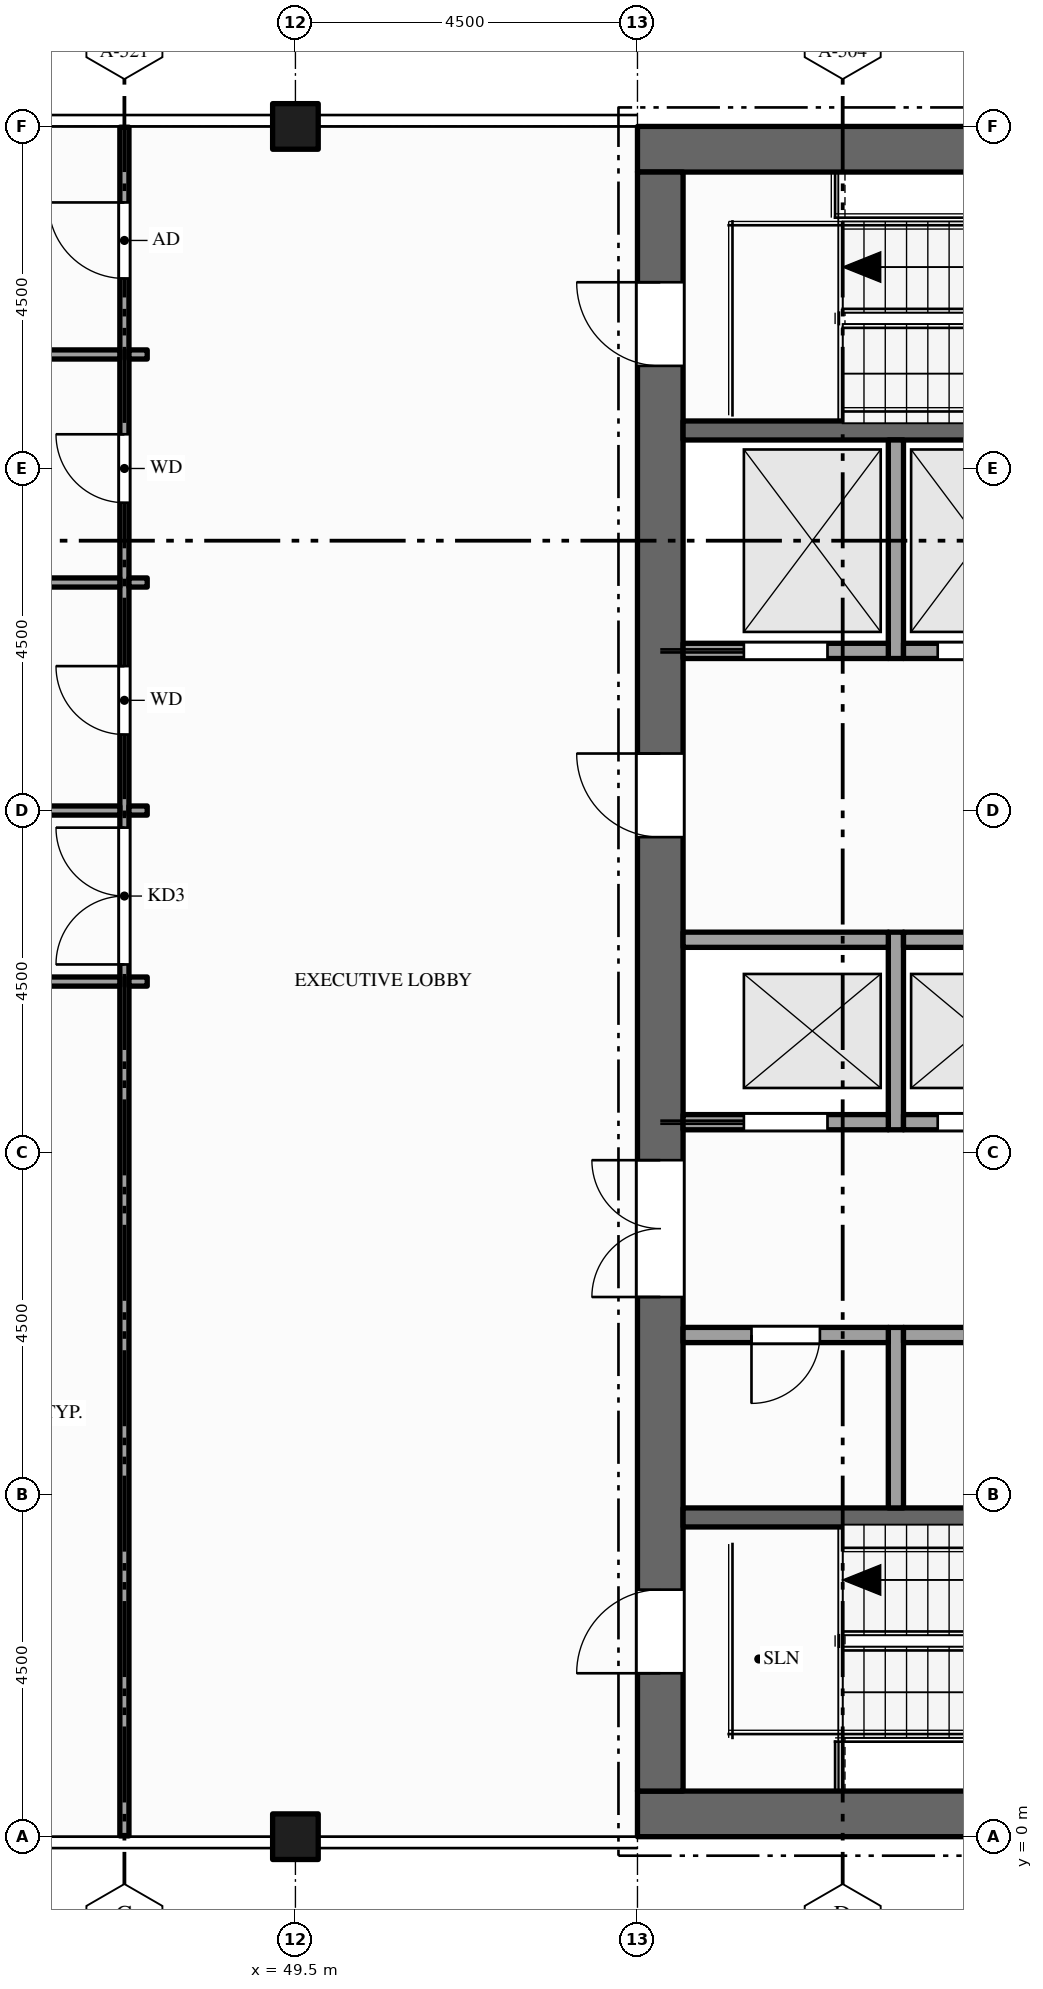
"""IFC4 building model, lengths in metres.
Left out: names, types, materials, properties, quantities, classifications, styles, units other than length and angle.
Written with IfcOpenShell. Run it as: python <this file> out.ifc"""

import sys

from ifc_helpers import new_model, si_unit, direction, frame, frame_2d, origin, origin_2d, place, context, subcontext, project, spatial, rectangle, hollow_rectangle, extrude, element, fill, save


model = new_model("IFC4")
c1 = context("Model", 3, precision=1e-05, world=origin(), true_north=direction((0.0, 1.0)))
c2 = subcontext(c1, "Body", "Model", "MODEL_VIEW")
j1 = project(units=[si_unit("LENGTHUNIT", "METRE"), si_unit("PLANEANGLEUNIT", "RADIAN")], contexts=[c1])
p1 = place(None, origin())
s1 = spatial("IfcSite", under=j1, at=p1, CompositionType="ELEMENT")
p2 = place(p1, origin())
s2 = spatial("IfcBuilding", under=s1, at=p2, CompositionType="ELEMENT")
p3 = place(p2, frame((0.0, 0.0, 323.0)))
s3 = spatial("IfcBuildingStorey", under=s2, at=p3, CompositionType="ELEMENT", Elevation=323.0)
for number, where, z_axis, x_axis in (
    (1, (67.5, 0.3, -0.15), (0.0, 0.0, 1.0), (-1.0, 0.0, 0.0)),
    (2, (54.0, 22.2, -0.15), (0.0, 0.0, 1.0), (1.0, 0.0, 0.0)),
):
    element("IfcWall", number, at=place(p3, frame(where, z_axis=z_axis, x_axis=x_axis)), inside=s3, PredefinedType="SHEAR", context=c2, shape_type="SweptSolid", body=[
        extrude(rectangle(XDim=13.5, YDim=0.6, at=frame_2d((6.75, 0.0))), origin(), (0.0, 0.0, 1.0), 4.5),
    ])
p4 = place(p3, frame((54.3, 0.6, -0.15), z_axis=(0.0, 0.0, 1.0), x_axis=(0.0, 1.0, 0.0)))
e3 = element("IfcWall", 3, at=p4, inside=s3, PredefinedType="SHEAR", context=c2, shape_type="SweptSolid", body=[
    extrude(rectangle(XDim=21.3, YDim=0.6, at=frame_2d((10.65, 0.0))), origin(), (0.0, 0.0, 1.0), 4.5),
])
p5 = place(p4, frame((6.5, 0.0, 0.15)))
e4 = element("IfcOpeningElement", 4, at=p5, cuts=e3, PredefinedType="OPENING", context=c2, shape_type="SweptSolid", body=[
    extrude(rectangle(XDim=1.8, YDim=2.1, at=frame_2d((0.9, 1.05))), frame((0.0, 0.31, 0.0), z_axis=(0.0, -1.0, 0.0), x_axis=(1.0, 0.0, 0.0)), (0.0, 0.0, 1.0), 0.62),
])
p6 = place(p4, frame((12.55, 0.0, 0.15)))
e5 = element("IfcOpeningElement", 5, at=p6, cuts=e3, PredefinedType="OPENING", context=c2, shape_type="SweptSolid", body=[
    extrude(rectangle(XDim=1.1, YDim=2.1, at=frame_2d((0.55, 1.05))), frame((0.0, 0.31, 0.0), z_axis=(0.0, -1.0, 0.0), x_axis=(1.0, 0.0, 0.0)), (0.0, 0.0, 1.0), 0.62),
])
p7 = place(p4, frame((1.55, 0.0, 0.15)))
e6 = element("IfcOpeningElement", 6, at=p7, cuts=e3, PredefinedType="OPENING", context=c2, shape_type="SweptSolid", body=[
    extrude(rectangle(XDim=1.1, YDim=2.1, at=frame_2d((0.55, 1.05))), frame((0.0, 0.31, 0.0), z_axis=(0.0, -1.0, 0.0), x_axis=(1.0, 0.0, 0.0)), (0.0, 0.0, 1.0), 0.62),
])
p8 = place(p4, frame((18.75, 0.0, 0.15)))
e7 = element("IfcOpeningElement", 7, at=p8, cuts=e3, PredefinedType="OPENING", context=c2, shape_type="SweptSolid", body=[
    extrude(rectangle(XDim=1.1, YDim=2.1, at=frame_2d((0.55, 1.05))), frame((0.0, 0.31, 0.0), z_axis=(0.0, -1.0, 0.0), x_axis=(1.0, 0.0, 0.0)), (0.0, 0.0, 1.0), 0.62),
])
for number, where, z_axis, x_axis in (
    (8, (49.5, 0.0, -0.15), (0.0, 0.0, 1.0), (1.0, 0.0, 0.0)),
    (9, (49.5, 22.5, -0.15), (0.0, 0.0, 1.0), (1.0, 0.0, 0.0)),
):
    element("IfcColumn", number, at=place(p3, frame(where, z_axis=z_axis, x_axis=x_axis)), inside=s3, PredefinedType="COLUMN", context=c2, shape_type="SweptSolid", body=[
        extrude(hollow_rectangle(XDim=0.6, YDim=0.6, WallThickness=0.03, at=origin_2d()), origin(), (0.0, 0.0, 1.0), 4.5),
    ])
p9 = place(p3, frame((47.25, 0.01, 0.0), z_axis=(0.0, 0.0, 1.0), x_axis=(0.0, 1.0, 0.0)))
e10 = element("IfcWall", 10, at=p9, inside=s3, PredefinedType="PARTITIONING", context=c2, shape_type="SweptSolid", body=[
    extrude(rectangle(XDim=22.48, YDim=0.12, at=frame_2d((11.24, 0.0))), origin(), (0.0, 0.0, 1.0), 3.359),
])
p10 = place(p9, frame((11.465, 0.0, 0.0)))
e11 = element("IfcOpeningElement", 11, at=p10, cuts=e10, PredefinedType="OPENING", context=c2, shape_type="SweptSolid", body=[
    extrude(rectangle(XDim=1.8, YDim=2.1, at=frame_2d((0.9, 1.05))), frame((0.0, 0.07, 0.0), z_axis=(0.0, -1.0, 0.0), x_axis=(1.0, 0.0, 0.0)), (0.0, 0.0, 1.0), 0.14),
])
p11 = place(p9, frame((14.49, 0.0, 0.0)))
e12 = element("IfcOpeningElement", 12, at=p11, cuts=e10, PredefinedType="OPENING", context=c2, shape_type="SweptSolid", body=[
    extrude(rectangle(XDim=0.9, YDim=2.1, at=frame_2d((0.45, 1.05))), frame((0.0, 0.07, 0.0), z_axis=(0.0, -1.0, 0.0), x_axis=(1.0, 0.0, 0.0)), (0.0, 0.0, 1.0), 0.14),
])
p12 = place(p9, frame((17.54, 0.0, 0.0)))
e13 = element("IfcOpeningElement", 13, at=p12, cuts=e10, PredefinedType="OPENING", context=c2, shape_type="SweptSolid", body=[
    extrude(rectangle(XDim=0.9, YDim=2.1, at=frame_2d((0.45, 1.05))), frame((0.0, 0.07, 0.0), z_axis=(0.0, -1.0, 0.0), x_axis=(1.0, 0.0, 0.0)), (0.0, 0.0, 1.0), 0.14),
])
p13 = place(p9, frame((20.49, 0.0, 0.0)))
e14 = element("IfcOpeningElement", 14, at=p13, cuts=e10, PredefinedType="OPENING", context=c2, shape_type="SweptSolid", body=[
    extrude(rectangle(XDim=1.0, YDim=2.1, at=frame_2d((0.5, 1.05))), frame((0.0, 0.07, 0.0), z_axis=(0.0, -1.0, 0.0), x_axis=(1.0, 0.0, 0.0)), (0.0, 0.0, 1.0), 0.14),
])
p14 = place(p3, frame((57.4, 4.325, 0.0), z_axis=(0.0, 0.0, 1.0), x_axis=(0.0, 1.0, 0.0)))
e15 = element("IfcWall", 15, at=p14, inside=s3, PredefinedType="PARTITIONING", context=c2, shape_type="SweptSolid", body=[
    extrude(rectangle(XDim=2.375, YDim=0.2, at=frame_2d((1.188, 0.0))), origin(), (0.0, 0.0, 1.0), 4.35),
])
p15 = place(p3, frame((57.4, 9.3, 0.0), z_axis=(0.0, 0.0, 1.0), x_axis=(0.0, 1.0, 0.0)))
e16 = element("IfcWall", 16, at=p15, inside=s3, PredefinedType="SOLIDWALL", context=c2, shape_type="SweptSolid", body=[
    extrude(rectangle(XDim=2.6, YDim=0.2, at=frame_2d((1.3, 0.0))), origin(), (0.0, 0.0, 1.0), 4.35),
])
p16 = place(p3, frame((57.4, 15.5, 0.0), z_axis=(0.0, 0.0, 1.0), x_axis=(0.0, 1.0, 0.0)))
e17 = element("IfcWall", 17, at=p16, inside=s3, PredefinedType="SOLIDWALL", context=c2, shape_type="SweptSolid", body=[
    extrude(rectangle(XDim=2.875, YDim=0.2, at=frame_2d((1.438, 0.0))), origin(), (0.0, 0.0, 1.0), 4.35),
])
p17 = place(p3, frame((54.6, 4.2, 0.0), z_axis=(0.0, 0.0, 1.0), x_axis=(1.0, 0.0, 0.0)))
e18 = element("IfcWall", 18, at=p17, inside=s3, PredefinedType="SHEAR", context=c2, shape_type="SweptSolid", body=[
    extrude(rectangle(XDim=6.675, YDim=0.25, at=frame_2d((3.337, 0.0))), origin(), (0.0, 0.0, 1.0), 4.35),
])
p18 = place(p3, frame((54.6, 6.6, 0.0), z_axis=(0.0, 0.0, 1.0), x_axis=(1.0, 0.0, 0.0)))
e19 = element("IfcWall", 19, at=p18, inside=s3, PredefinedType="PARTITIONING", context=c2, shape_type="SweptSolid", body=[
    extrude(rectangle(XDim=2.7, YDim=0.2, at=frame_2d((1.35, 0.0))), origin(), (0.0, 0.0, 1.0), 4.35),
])
p19 = place(p18, frame((0.9, 0.0, 0.0)))
e20 = element("IfcOpeningElement", 20, at=p19, cuts=e19, PredefinedType="OPENING", context=c2, shape_type="SweptSolid", body=[
    extrude(rectangle(XDim=0.9, YDim=2.1, at=frame_2d((0.45, 1.05))), frame((0.0, 0.11, 0.0), z_axis=(0.0, -1.0, 0.0), x_axis=(1.0, 0.0, 0.0)), (0.0, 0.0, 1.0), 0.22),
])
p20 = place(p3, frame((57.5, 6.6, 0.0), z_axis=(0.0, 0.0, 1.0), x_axis=(1.0, 0.0, 0.0)))
e21 = element("IfcWall", 21, at=p20, inside=s3, PredefinedType="PARTITIONING", context=c2, shape_type="SweptSolid", body=[
    extrude(rectangle(XDim=4.2, YDim=0.2, at=frame_2d((2.1, 0.0))), origin(), (0.0, 0.0, 1.0), 4.35),
])
p21 = place(p20, frame((1.65, 0.0, 0.0)))
e22 = element("IfcOpeningElement", 22, at=p21, cuts=e21, PredefinedType="OPENING", context=c2, shape_type="SweptSolid", body=[
    extrude(rectangle(XDim=0.9, YDim=2.1, at=frame_2d((0.45, 1.05))), frame((0.0, 0.11, 0.0), z_axis=(0.0, -1.0, 0.0), x_axis=(1.0, 0.0, 0.0)), (0.0, 0.0, 1.0), 0.22),
])
p22 = place(p3, frame((54.6, 9.4, 0.0), z_axis=(0.0, 0.0, 1.0), x_axis=(1.0, 0.0, 0.0)))
e23 = element("IfcWall", 23, at=p22, inside=s3, PredefinedType="SOLIDWALL", context=c2, shape_type="SweptSolid", body=[
    extrude(rectangle(XDim=2.7, YDim=0.2, at=frame_2d((1.35, 0.0))), origin(), (0.0, 0.0, 1.0), 4.35),
])
p23 = place(p22, frame((0.8, 0.0, 0.012)))
e24 = element("IfcOpeningElement", 24, at=p23, cuts=e23, PredefinedType="OPENING", context=c2, shape_type="SweptSolid", body=[
    extrude(rectangle(XDim=1.1, YDim=2.1, at=frame_2d((0.55, 1.05))), frame((0.0, 0.11, 0.0), z_axis=(0.0, -1.0, 0.0), x_axis=(1.0, 0.0, 0.0)), (0.0, 0.0, 1.0), 0.22),
])
p24 = place(p3, frame((57.5, 9.4, 0.0), z_axis=(0.0, 0.0, 1.0), x_axis=(1.0, 0.0, 0.0)))
e25 = element("IfcWall", 25, at=p24, inside=s3, PredefinedType="SOLIDWALL", context=c2, shape_type="SweptSolid", body=[
    extrude(rectangle(XDim=2.0, YDim=0.2, at=frame_2d((1.0, 0.0))), origin(), (0.0, 0.0, 1.0), 4.35),
])
p25 = place(p24, frame((0.45, 0.0, 0.012)))
e26 = element("IfcOpeningElement", 26, at=p25, cuts=e25, PredefinedType="OPENING", context=c2, shape_type="SweptSolid", body=[
    extrude(rectangle(XDim=1.1, YDim=2.1, at=frame_2d((0.55, 1.05))), frame((0.0, 0.11, 0.0), z_axis=(0.0, -1.0, 0.0), x_axis=(1.0, 0.0, 0.0)), (0.0, 0.0, 1.0), 0.22),
])
p26 = place(p3, frame((38.31, 11.25, 0.0), z_axis=(0.0, 0.0, 1.0), x_axis=(1.0, 0.0, 0.0)))
e27 = element("IfcWall", 27, at=p26, inside=s3, PredefinedType="PARTITIONING", context=c2, shape_type="SweptSolid", body=[
    extrude(rectangle(XDim=8.88, YDim=0.12, at=frame_2d((4.44, 0.0))), origin(), (0.0, 0.0, 1.0), 3.359),
])
p27 = place(p26, frame((3.84, 0.0, 0.0)))
e28 = element("IfcOpeningElement", 28, at=p27, cuts=e27, PredefinedType="OPENING", context=c2, shape_type="SweptSolid", body=[
    extrude(rectangle(XDim=1.2, YDim=2.1, at=frame_2d((0.6, 1.05))), frame((0.0, 0.07, 0.0), z_axis=(0.0, -1.0, 0.0), x_axis=(1.0, 0.0, 0.0)), (0.0, 0.0, 1.0), 0.14),
])
p28 = place(p3, frame((47.31, 11.25, 0.0), z_axis=(0.0, 0.0, 1.0), x_axis=(1.0, 0.0, 0.0)))
e29 = element("IfcWall", 29, at=p28, inside=s3, PredefinedType="PARTITIONING", context=c2, shape_type="SweptSolid", body=[
    extrude(rectangle(XDim=0.24, YDim=0.12, at=frame_2d((0.12, 0.0))), origin(), (0.0, 0.0, 1.0), 3.359),
])
p29 = place(p3, frame((54.6, 11.8, 0.0), z_axis=(0.0, 0.0, 1.0), x_axis=(1.0, 0.0, 0.0)))
e30 = element("IfcWall", 30, at=p29, inside=s3, PredefinedType="SOLIDWALL", context=c2, shape_type="SweptSolid", body=[
    extrude(rectangle(XDim=2.7, YDim=0.2, at=frame_2d((1.35, 0.0))), origin(), (0.0, 0.0, 1.0), 4.35),
])
p30 = place(p3, frame((57.5, 11.8, 0.0), z_axis=(0.0, 0.0, 1.0), x_axis=(1.0, 0.0, 0.0)))
e31 = element("IfcWall", 31, at=p30, inside=s3, PredefinedType="SOLIDWALL", context=c2, shape_type="SweptSolid", body=[
    extrude(rectangle(XDim=2.0, YDim=0.2, at=frame_2d((1.0, 0.0))), origin(), (0.0, 0.0, 1.0), 4.35),
])
p31 = place(p3, frame((42.81, 13.5, 0.0), z_axis=(0.0, 0.0, 1.0), x_axis=(1.0, 0.0, 0.0)))
e32 = element("IfcWall", 32, at=p31, inside=s3, PredefinedType="PARTITIONING", context=c2, shape_type="SweptSolid", body=[
    extrude(rectangle(XDim=4.38, YDim=0.12, at=frame_2d((2.19, 0.0))), origin(), (0.0, 0.0, 1.0), 3.359),
])
p32 = place(p3, frame((47.31, 13.5, 0.0), z_axis=(0.0, 0.0, 1.0), x_axis=(1.0, 0.0, 0.0)))
e33 = element("IfcWall", 33, at=p32, inside=s3, PredefinedType="PARTITIONING", context=c2, shape_type="SweptSolid", body=[
    extrude(rectangle(XDim=0.24, YDim=0.12, at=frame_2d((0.12, 0.0))), origin(), (0.0, 0.0, 1.0), 3.359),
])
p33 = place(p3, frame((54.6, 15.6, 0.0), z_axis=(0.0, 0.0, 1.0), x_axis=(1.0, 0.0, 0.0)))
e34 = element("IfcWall", 34, at=p33, inside=s3, PredefinedType="SOLIDWALL", context=c2, shape_type="SweptSolid", body=[
    extrude(rectangle(XDim=2.7, YDim=0.2, at=frame_2d((1.35, 0.0))), origin(), (0.0, 0.0, 1.0), 4.35),
])
p34 = place(p33, frame((0.8, 0.0, 0.012)))
e35 = element("IfcOpeningElement", 35, at=p34, cuts=e34, PredefinedType="OPENING", context=c2, shape_type="SweptSolid", body=[
    extrude(rectangle(XDim=1.1, YDim=2.1, at=frame_2d((0.55, 1.05))), frame((0.0, 0.11, 0.0), z_axis=(0.0, -1.0, 0.0), x_axis=(1.0, 0.0, 0.0)), (0.0, 0.0, 1.0), 0.22),
])
p35 = place(p3, frame((57.5, 15.6, 0.0), z_axis=(0.0, 0.0, 1.0), x_axis=(1.0, 0.0, 0.0)))
e36 = element("IfcWall", 36, at=p35, inside=s3, PredefinedType="SOLIDWALL", context=c2, shape_type="SweptSolid", body=[
    extrude(rectangle(XDim=2.0, YDim=0.2, at=frame_2d((1.0, 0.0))), origin(), (0.0, 0.0, 1.0), 4.35),
])
p36 = place(p35, frame((0.45, 0.0, 0.012)))
e37 = element("IfcOpeningElement", 37, at=p36, cuts=e36, PredefinedType="OPENING", context=c2, shape_type="SweptSolid", body=[
    extrude(rectangle(XDim=1.1, YDim=2.1, at=frame_2d((0.55, 1.05))), frame((0.0, 0.11, 0.0), z_axis=(0.0, -1.0, 0.0), x_axis=(1.0, 0.0, 0.0)), (0.0, 0.0, 1.0), 0.22),
])
p37 = place(p3, frame((42.81, 16.5, 0.0), z_axis=(0.0, 0.0, 1.0), x_axis=(1.0, 0.0, 0.0)))
e38 = element("IfcWall", 38, at=p37, inside=s3, PredefinedType="PARTITIONING", context=c2, shape_type="SweptSolid", body=[
    extrude(rectangle(XDim=4.38, YDim=0.12, at=frame_2d((2.19, 0.0))), origin(), (0.0, 0.0, 1.0), 3.359),
])
p38 = place(p3, frame((47.31, 16.5, 0.0), z_axis=(0.0, 0.0, 1.0), x_axis=(1.0, 0.0, 0.0)))
e39 = element("IfcWall", 39, at=p38, inside=s3, PredefinedType="PARTITIONING", context=c2, shape_type="SweptSolid", body=[
    extrude(rectangle(XDim=0.24, YDim=0.12, at=frame_2d((0.12, 0.0))), origin(), (0.0, 0.0, 1.0), 3.359),
])
p39 = place(p3, frame((54.6, 18.5, 0.0), z_axis=(0.0, 0.0, 1.0), x_axis=(1.0, 0.0, 0.0)))
e40 = element("IfcWall", 40, at=p39, inside=s3, PredefinedType="SHEAR", context=c2, shape_type="SweptSolid", body=[
    extrude(rectangle(XDim=6.675, YDim=0.25, at=frame_2d((3.337, 0.0))), origin(), (0.0, 0.0, 1.0), 4.35),
])
p40 = place(p3, frame((42.81, 19.5, 0.0), z_axis=(0.0, 0.0, 1.0), x_axis=(1.0, 0.0, 0.0)))
e41 = element("IfcWall", 41, at=p40, inside=s3, PredefinedType="PARTITIONING", context=c2, shape_type="SweptSolid", body=[
    extrude(rectangle(XDim=4.38, YDim=0.12, at=frame_2d((2.19, 0.0))), origin(), (0.0, 0.0, 1.0), 3.359),
])
p41 = place(p3, frame((47.31, 19.5, 0.0), z_axis=(0.0, 0.0, 1.0), x_axis=(1.0, 0.0, 0.0)))
e42 = element("IfcWall", 42, at=p41, inside=s3, PredefinedType="PARTITIONING", context=c2, shape_type="SweptSolid", body=[
    extrude(rectangle(XDim=0.24, YDim=0.12, at=frame_2d((0.12, 0.0))), origin(), (0.0, 0.0, 1.0), 3.359),
])
p42 = place(p23, origin())
e43 = element("IfcDoor", 43, at=p42, inside=s3, OperationType="SLIDING_TO_LEFT", PredefinedType="DOOR", context=c2, shape_type="SweptSolid", body=[
    extrude(rectangle(XDim=1.1, YDim=2.1, at=frame_2d((0.55, 1.05))), frame((0.0, 0.025, 0.0), z_axis=(0.0, -1.0, 0.0), x_axis=(1.0, 0.0, 0.0)), (0.0, 0.0, 1.0), 0.05),
])
fill(e24, e43)
p43 = place(p25, origin())
e44 = element("IfcDoor", 44, at=p43, inside=s3, OperationType="SLIDING_TO_RIGHT", PredefinedType="DOOR", context=c2, shape_type="SweptSolid", body=[
    extrude(rectangle(XDim=1.1, YDim=2.1, at=frame_2d((0.55, 1.05))), frame((0.0, 0.025, 0.0), z_axis=(0.0, -1.0, 0.0), x_axis=(1.0, 0.0, 0.0)), (0.0, 0.0, 1.0), 0.05),
])
fill(e26, e44)
p44 = place(p34, origin())
e45 = element("IfcDoor", 45, at=p44, inside=s3, OperationType="SLIDING_TO_LEFT", PredefinedType="DOOR", context=c2, shape_type="SweptSolid", body=[
    extrude(rectangle(XDim=1.1, YDim=2.1, at=frame_2d((0.55, 1.05))), frame((0.0, 0.025, 0.0), z_axis=(0.0, -1.0, 0.0), x_axis=(1.0, 0.0, 0.0)), (0.0, 0.0, 1.0), 0.05),
])
fill(e35, e45)
p45 = place(p36, origin())
e46 = element("IfcDoor", 46, at=p45, inside=s3, OperationType="SLIDING_TO_RIGHT", PredefinedType="DOOR", context=c2, shape_type="SweptSolid", body=[
    extrude(rectangle(XDim=1.1, YDim=2.1, at=frame_2d((0.55, 1.05))), frame((0.0, 0.025, 0.0), z_axis=(0.0, -1.0, 0.0), x_axis=(1.0, 0.0, 0.0)), (0.0, 0.0, 1.0), 0.05),
])
fill(e37, e46)
p46 = place(p5, origin())
e47 = element("IfcDoor", 47, at=p46, inside=s3, OperationType="DOUBLE_DOOR_SINGLE_SWING", PredefinedType="DOOR", context=c2, shape_type="SweptSolid", body=[
    extrude(rectangle(XDim=1.8, YDim=2.1, at=frame_2d((0.9, 1.05))), frame((0.0, 0.025, 0.0), z_axis=(0.0, -1.0, 0.0), x_axis=(1.0, 0.0, 0.0)), (0.0, 0.0, 1.0), 0.05),
])
fill(e4, e47)
p47 = place(p6, origin())
e48 = element("IfcDoor", 48, at=p47, inside=s3, OperationType="SINGLE_SWING_RIGHT", PredefinedType="DOOR", context=c2, shape_type="SweptSolid", body=[
    extrude(rectangle(XDim=1.1, YDim=2.1, at=frame_2d((0.55, 1.05))), frame((0.0, 0.025, 0.0), z_axis=(0.0, -1.0, 0.0), x_axis=(1.0, 0.0, 0.0)), (0.0, 0.0, 1.0), 0.05),
])
fill(e5, e48)
p48 = place(p7, origin())
e49 = element("IfcDoor", 49, at=p48, inside=s3, OperationType="SINGLE_SWING_LEFT", PredefinedType="DOOR", context=c2, shape_type="SweptSolid", body=[
    extrude(rectangle(XDim=1.1, YDim=2.1, at=frame_2d((0.55, 1.05))), frame((0.0, 0.025, 0.0), z_axis=(0.0, -1.0, 0.0), x_axis=(1.0, 0.0, 0.0)), (0.0, 0.0, 1.0), 0.05),
])
fill(e6, e49)
p49 = place(p8, origin())
e50 = element("IfcDoor", 50, at=p49, inside=s3, OperationType="SINGLE_SWING_RIGHT", PredefinedType="DOOR", context=c2, shape_type="SweptSolid", body=[
    extrude(rectangle(XDim=1.1, YDim=2.1, at=frame_2d((0.55, 1.05))), frame((0.0, 0.025, 0.0), z_axis=(0.0, -1.0, 0.0), x_axis=(1.0, 0.0, 0.0)), (0.0, 0.0, 1.0), 0.05),
])
fill(e7, e50)
p50 = place(p19, origin())
e51 = element("IfcDoor", 51, at=p50, inside=s3, OperationType="SINGLE_SWING_LEFT", PredefinedType="DOOR", context=c2, shape_type="SweptSolid", body=[
    extrude(rectangle(XDim=0.9, YDim=2.1, at=frame_2d((0.45, 1.05))), frame((0.0, 0.025, 0.0), z_axis=(0.0, -1.0, 0.0), x_axis=(1.0, 0.0, 0.0)), (0.0, 0.0, 1.0), 0.05),
])
fill(e20, e51)
p51 = place(p10, origin())
e52 = element("IfcDoor", 52, at=p51, inside=s3, OperationType="DOUBLE_DOOR_SINGLE_SWING", PredefinedType="DOOR", context=c2, shape_type="SweptSolid", body=[
    extrude(rectangle(XDim=1.8, YDim=2.1, at=frame_2d((0.9, 1.05))), frame((0.0, 0.025, 0.0), z_axis=(0.0, -1.0, 0.0), x_axis=(1.0, 0.0, 0.0)), (0.0, 0.0, 1.0), 0.05),
])
fill(e11, e52)
p52 = place(p11, origin())
e53 = element("IfcDoor", 53, at=p52, inside=s3, OperationType="SINGLE_SWING_RIGHT", PredefinedType="DOOR", context=c2, shape_type="SweptSolid", body=[
    extrude(rectangle(XDim=0.9, YDim=2.1, at=frame_2d((0.45, 1.05))), frame((0.0, 0.025, 0.0), z_axis=(0.0, -1.0, 0.0), x_axis=(1.0, 0.0, 0.0)), (0.0, 0.0, 1.0), 0.05),
])
fill(e12, e53)
p53 = place(p12, origin())
e54 = element("IfcDoor", 54, at=p53, inside=s3, OperationType="SINGLE_SWING_RIGHT", PredefinedType="DOOR", context=c2, shape_type="SweptSolid", body=[
    extrude(rectangle(XDim=0.9, YDim=2.1, at=frame_2d((0.45, 1.05))), frame((0.0, 0.025, 0.0), z_axis=(0.0, -1.0, 0.0), x_axis=(1.0, 0.0, 0.0)), (0.0, 0.0, 1.0), 0.05),
])
fill(e13, e54)
p54 = place(p13, origin())
e55 = element("IfcDoor", 55, at=p54, inside=s3, OperationType="SINGLE_SWING_RIGHT", PredefinedType="DOOR", context=c2, shape_type="SweptSolid", body=[
    extrude(rectangle(XDim=1.0, YDim=2.1, at=frame_2d((0.5, 1.05))), frame((0.0, 0.025, 0.0), z_axis=(0.0, -1.0, 0.0), x_axis=(1.0, 0.0, 0.0)), (0.0, 0.0, 1.0), 0.05),
])
fill(e14, e55)
save(model, sys.argv[1])
